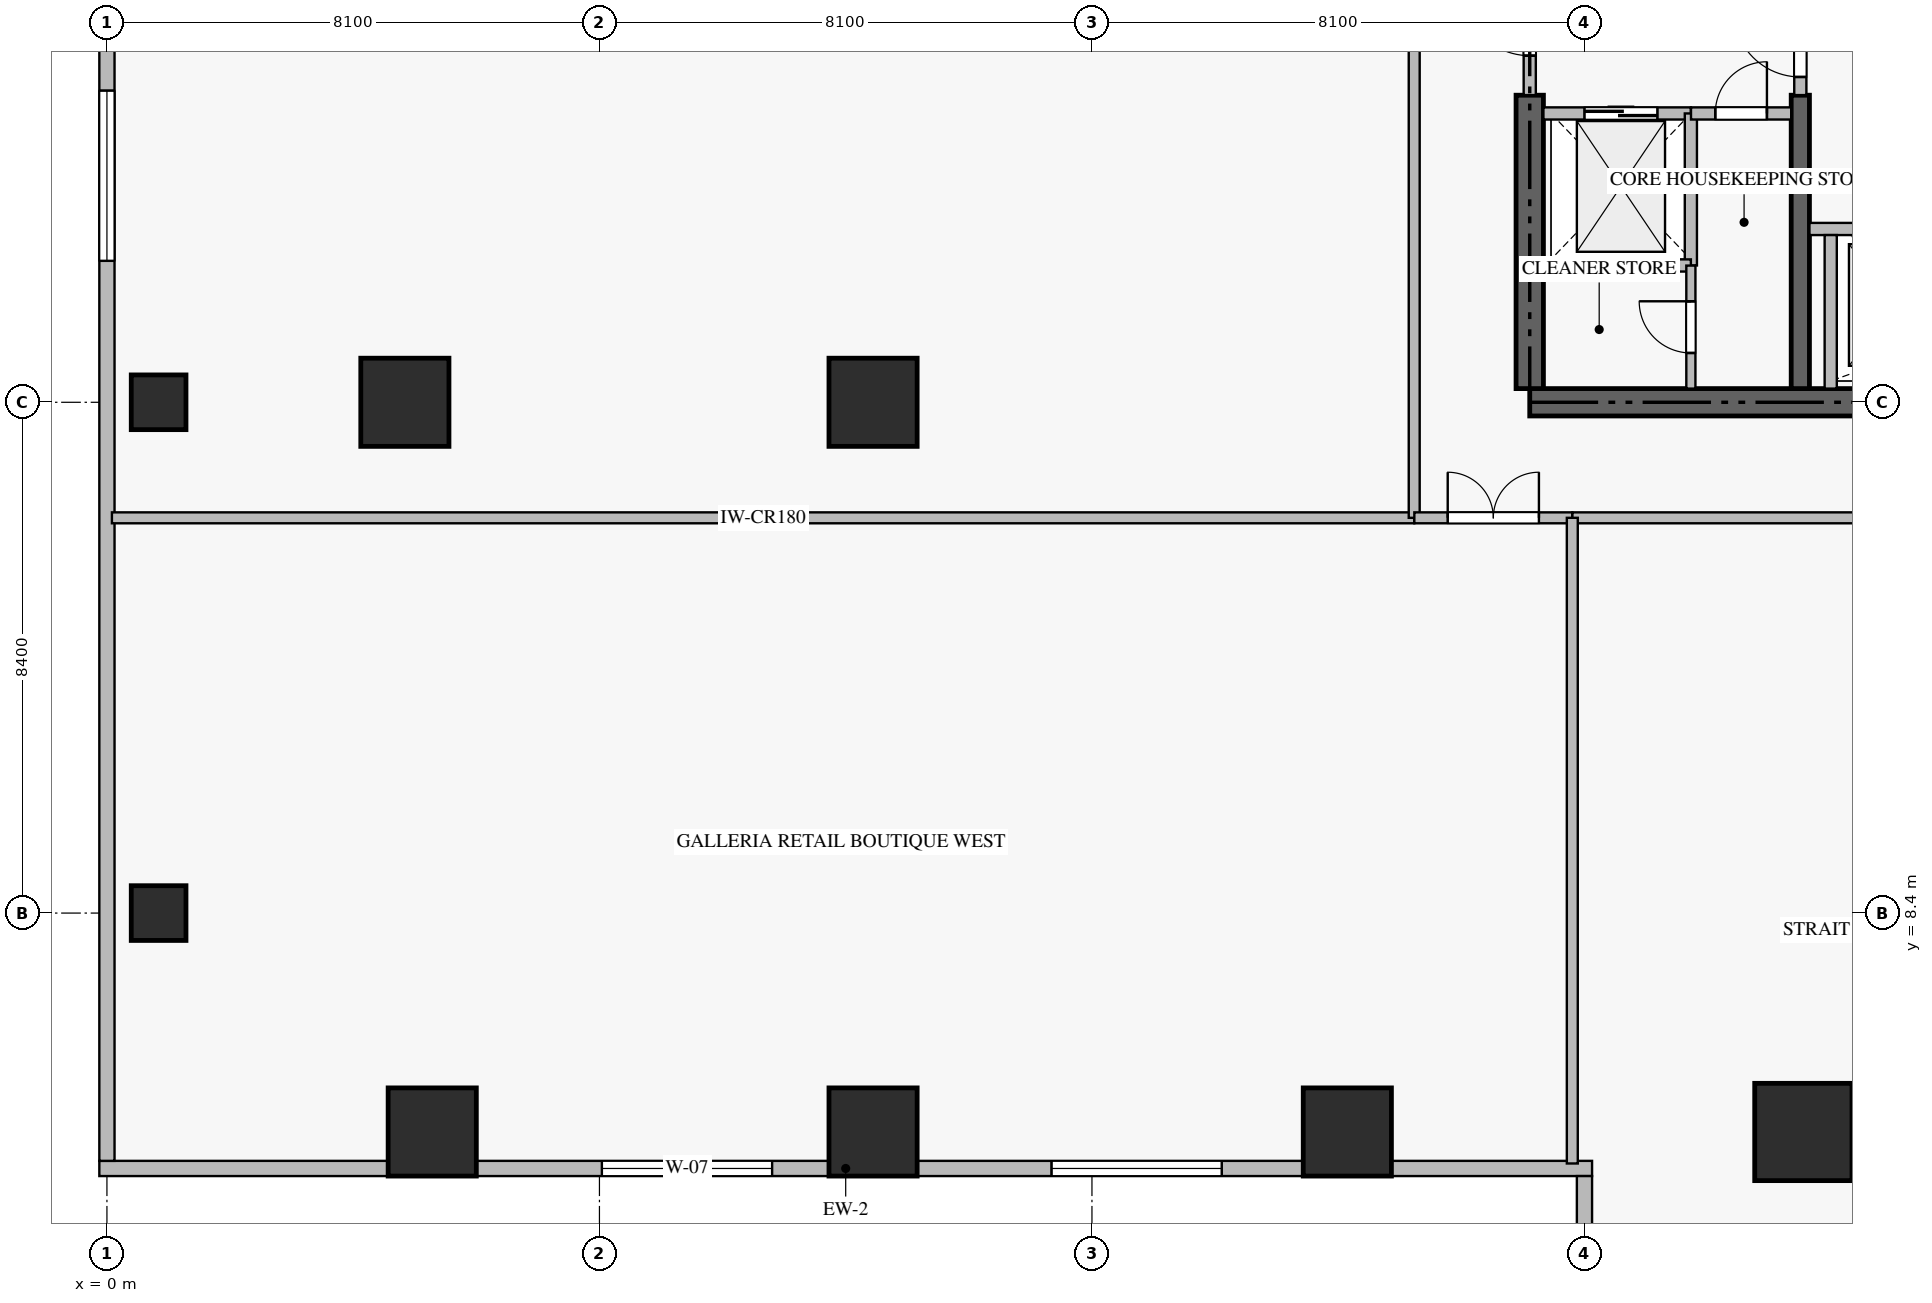
"""IFC4 building model, lengths in metres.
Left out: names, types, materials, properties, quantities, classifications, styles, units other than length and angle.
Written with IfcOpenShell. Run it as: python <this file> out.ifc"""

import sys

from ifc_helpers import new_model, si_unit, direction, frame, frame_2d, origin, origin_2d, place, context, subcontext, project, spatial, rectangle, extrude, source, transform, mapped, element, fill, save


model = new_model("IFC4")
c1 = context("Model", 3, precision=1e-05, world=origin(), true_north=direction((0.0, 1.0)))
c2 = subcontext(c1, "Body", "Model", "MODEL_VIEW")
j1 = project(units=[si_unit("LENGTHUNIT", "METRE"), si_unit("PLANEANGLEUNIT", "RADIAN")], contexts=[c1])
p1 = place(None, origin())
s1 = spatial("IfcSite", under=j1, at=p1, CompositionType="ELEMENT")
p2 = place(p1, origin())
s2 = spatial("IfcBuilding", under=s1, at=p2, CompositionType="ELEMENT")
p3 = place(p2, frame((0.0, 0.0, 5.5)))
s3 = spatial("IfcBuildingStorey", under=s2, at=p3, CompositionType="ELEMENT", Elevation=5.5)
p4 = place(p3, frame((23.4, 16.8, -0.38), z_axis=(0.0, 0.0, 1.0), x_axis=(1.0, 0.0, 0.0)))
e1 = element("IfcWall", 1, at=p4, inside=s3, PredefinedType="SHEAR", context=c2, shape_type="SweptSolid", body=[
    extrude(rectangle(XDim=18.0, YDim=0.45, at=frame_2d((9.0, 0.0))), origin(), (0.0, 0.0, 1.0), 4.998),
])
p5 = place(p3, frame((23.4, 17.025, -0.38), z_axis=(0.0, 0.0, 1.0), x_axis=(0.0, 1.0, 0.0)))
e2 = element("IfcWall", 2, at=p5, inside=s3, PredefinedType="SHEAR", context=c2, shape_type="SweptSolid", body=[
    extrude(rectangle(XDim=4.825, YDim=0.45, at=frame_2d((2.413, 0.0))), origin(), (0.0, 0.0, 1.0), 4.998),
])
p6 = place(p3, frame((27.85, 17.025, -0.38), z_axis=(0.0, 0.0, 1.0), x_axis=(0.0, 1.0, 0.0)))
e3 = element("IfcWall", 3, at=p6, inside=s3, PredefinedType="SHEAR", context=c2, shape_type="SweptSolid", body=[
    extrude(rectangle(XDim=4.825, YDim=0.3, at=frame_2d((2.413, 0.0))), origin(), (0.0, 0.0, 1.0), 4.998),
])
m1 = source(origin(), c2, "Body", "SweptSolid", [
    extrude(rectangle(XDim=0.9, YDim=0.9, at=origin_2d()), origin(), (0.0, 0.0, 1.0), 5.0),
])
for number, where, z_axis, x_axis in (
    (4, (0.85, 8.4, -0.38), (0.0, 0.0, 1.0), (1.0, 0.0, 0.0)),
    (5, (0.85, 16.8, -0.38), (0.0, 0.0, 1.0), (1.0, 0.0, 0.0)),
):
    element("IfcColumn", number, at=place(p3, frame(where, z_axis=z_axis, x_axis=x_axis)), inside=s3, PredefinedType="COLUMN", context=c2, shape_type="MappedRepresentation", body=[
        mapped(m1, transform((0.0, 0.0, 0.0), scale=1.0)),
    ])
m2 = source(origin(), c2, "Body", "SweptSolid", [
    extrude(rectangle(XDim=1.45, YDim=1.45, at=origin_2d()), origin(), (0.0, 0.0, 1.0), 5.0),
])
for number, where, z_axis, x_axis in (
    (6, (12.6, 4.8, -0.38), (0.0, 0.0, 1.0), (1.0, 0.0, 0.0)),
    (7, (20.4, 4.8, -0.38), (0.0, 0.0, 1.0), (1.0, 0.0, 0.0)),
):
    element("IfcColumn", number, at=place(p3, frame(where, z_axis=z_axis, x_axis=x_axis)), inside=s3, PredefinedType="COLUMN", context=c2, shape_type="MappedRepresentation", body=[
        mapped(m2, transform((0.0, 0.0, 0.0), scale=1.0)),
    ])
m3 = source(origin(), c2, "Body", "SweptSolid", [
    extrude(rectangle(XDim=1.6, YDim=1.6, at=origin_2d()), origin(), (0.0, 0.0, 1.0), 5.0),
])
p7 = place(p3, frame((27.9, 4.8, -0.38), z_axis=(0.0, 0.0, 1.0), x_axis=(1.0, 0.0, 0.0)))
e8 = element("IfcColumn", 8, at=p7, inside=s3, PredefinedType="COLUMN", context=c2, shape_type="MappedRepresentation", body=[
    mapped(m3, transform((0.0, 0.0, 0.0), scale=1.0)),
])
for number, where, z_axis, x_axis in (
    (9, (12.6, 16.8, -0.38), (0.0, 0.0, 1.0), (1.0, 0.0, 0.0)),
    (10, (4.9, 16.8, -0.38), (0.0, 0.0, 1.0), (1.0, 0.0, 0.0)),
    (11, (5.35, 4.8, -0.38), (0.0, 0.0, 1.0), (1.0, 0.0, 0.0)),
):
    element("IfcColumn", number, at=place(p3, frame(where, z_axis=z_axis, x_axis=x_axis)), inside=s3, PredefinedType="COLUMN", context=c2, shape_type="MappedRepresentation", body=[
        mapped(m2, transform((0.0, 0.0, 0.0), scale=1.0)),
    ])
p8 = place(p3, frame((-0.125, 4.2, 0.0), z_axis=(0.0, 0.0, 1.0), x_axis=(1.0, 0.0, 0.0)))
e12 = element("IfcWall", 12, at=p8, inside=s3, PredefinedType="ELEMENTEDWALL", context=c2, shape_type="SweptSolid", body=[
    extrude(rectangle(XDim=24.55, YDim=0.25, at=frame_2d((12.275, 0.0))), origin(), (0.0, 0.0, 1.0), 4.605),
])
p9 = place(p8, frame((8.265, 0.0, 0.6)))
e13 = element("IfcOpeningElement", 13, at=p9, cuts=e12, PredefinedType="OPENING", context=c2, shape_type="SweptSolid", body=[
    extrude(rectangle(XDim=2.8, YDim=3.0, at=frame_2d((1.4, 1.5))), frame((0.0, 0.135, 0.0), z_axis=(0.0, -1.0, 0.0), x_axis=(1.0, 0.0, 0.0)), (0.0, 0.0, 1.0), 0.27),
])
p10 = place(p8, frame((15.66, 0.0, 0.6)))
e14 = element("IfcOpeningElement", 14, at=p10, cuts=e12, PredefinedType="OPENING", context=c2, shape_type="SweptSolid", body=[
    extrude(rectangle(XDim=2.8, YDim=3.0, at=frame_2d((1.4, 1.5))), frame((0.0, 0.135, 0.0), z_axis=(0.0, -1.0, 0.0), x_axis=(1.0, 0.0, 0.0)), (0.0, 0.0, 1.0), 0.27),
])
p11 = place(p3, frame((24.3, 4.075, 0.0), z_axis=(0.0, 0.0, 1.0), x_axis=(0.0, -1.0, 0.0)))
e15 = element("IfcWall", 15, at=p11, inside=s3, PredefinedType="ELEMENTEDWALL", context=c2, shape_type="SweptSolid", body=[
    extrude(rectangle(XDim=1.675, YDim=0.25, at=frame_2d((0.837, 0.0))), origin(), (0.0, 0.0, 1.0), 4.605),
])
p12 = place(p3, frame((0.0, 46.075, 0.0), z_axis=(0.0, 0.0, 1.0), x_axis=(0.0, -1.0, 0.0)))
e16 = element("IfcWall", 16, at=p12, inside=s3, PredefinedType="ELEMENTEDWALL", context=c2, shape_type="SweptSolid", body=[
    extrude(rectangle(XDim=41.75, YDim=0.25, at=frame_2d((20.875, 0.0))), origin(), (0.0, 0.0, 1.0), 4.605),
])
p13 = place(p12, frame((14.801, 0.0, 0.6)))
e17 = element("IfcOpeningElement", 17, at=p13, cuts=e16, PredefinedType="OPENING", context=c2, shape_type="SweptSolid", body=[
    extrude(rectangle(XDim=2.8, YDim=3.0, at=frame_2d((1.4, 1.5))), frame((0.0, 0.135, 0.0), z_axis=(0.0, -1.0, 0.0), x_axis=(1.0, 0.0, 0.0)), (0.0, 0.0, 1.0), 0.27),
])
p14 = place(p12, frame((24.149, 0.0, 0.6)))
e18 = element("IfcOpeningElement", 18, at=p14, cuts=e16, PredefinedType="OPENING", context=c2, shape_type="SweptSolid", body=[
    extrude(rectangle(XDim=2.8, YDim=3.0, at=frame_2d((1.4, 1.5))), frame((0.0, 0.135, 0.0), z_axis=(0.0, -1.0, 0.0), x_axis=(1.0, 0.0, 0.0)), (0.0, 0.0, 1.0), 0.27),
])
p15 = place(p3, frame((23.625, 21.55, 0.0), z_axis=(0.0, 0.0, 1.0), x_axis=(1.0, 0.0, 0.0)))
e19 = element("IfcWall", 19, at=p15, inside=s3, PredefinedType="STANDARD", context=c2, shape_type="SweptSolid", body=[
    extrude(rectangle(XDim=2.425, YDim=0.2, at=frame_2d((1.212, 0.0))), origin(), (0.0, 0.0, 1.0), 4.62),
])
p16 = place(p15, frame((0.675, 0.0, 0.0)))
e20 = element("IfcOpeningElement", 20, at=p16, cuts=e19, PredefinedType="OPENING", context=c2, shape_type="SweptSolid", body=[
    extrude(rectangle(XDim=1.2, YDim=2.2, at=frame_2d((0.6, 1.1))), frame((0.0, 0.11, 0.0), z_axis=(0.0, -1.0, 0.0), x_axis=(1.0, 0.0, 0.0)), (0.0, 0.0, 1.0), 0.22),
])
p17 = place(p3, frame((28.0, 19.65, 0.0), z_axis=(0.0, 0.0, 1.0), x_axis=(1.0, 0.0, 0.0)))
e21 = element("IfcWall", 21, at=p17, inside=s3, PredefinedType="STANDARD", context=c2, shape_type="SweptSolid", body=[
    extrude(rectangle(XDim=2.65, YDim=0.2, at=frame_2d((1.325, 0.0))), origin(), (0.0, 0.0, 1.0), 4.62),
])
p18 = place(p17, frame((0.9, 0.0, 0.0)))
e22 = element("IfcOpeningElement", 22, at=p18, cuts=e21, PredefinedType="OPENING", context=c2, shape_type="SweptSolid", body=[
    extrude(rectangle(XDim=1.1, YDim=2.2, at=frame_2d((0.55, 1.1))), frame((0.0, 0.11, 0.0), z_axis=(0.0, -1.0, 0.0), x_axis=(1.0, 0.0, 0.0)), (0.0, 0.0, 1.0), 0.22),
])
p19 = place(p3, frame((28.35, 17.025, 0.0), z_axis=(0.0, 0.0, 1.0), x_axis=(0.0, 1.0, 0.0)))
e23 = element("IfcWall", 23, at=p19, inside=s3, PredefinedType="STANDARD", context=c2, shape_type="SweptSolid", body=[
    extrude(rectangle(XDim=2.525, YDim=0.2, at=frame_2d((1.263, 0.0))), origin(), (0.0, 0.0, 1.0), 4.62),
])
p20 = place(p3, frame((26.05, 19.05, 0.0), z_axis=(0.0, 0.0, 1.0), x_axis=(0.0, 1.0, 0.0)))
e24 = element("IfcWall", 24, at=p20, inside=s3, PredefinedType="STANDARD", context=c2, shape_type="SweptSolid", body=[
    extrude(rectangle(XDim=2.5, YDim=0.2, at=frame_2d((1.25, 0.0))), origin(), (0.0, 0.0, 1.0), 4.62),
])
p21 = place(p3, frame((23.625, 19.05, 0.0), z_axis=(0.0, 0.0, 1.0), x_axis=(1.0, 0.0, 0.0)))
e25 = element("IfcWall", 25, at=p21, inside=s3, PredefinedType="STANDARD", context=c2, shape_type="SweptSolid", body=[
    extrude(rectangle(XDim=2.425, YDim=0.2, at=frame_2d((1.212, 0.0))), origin(), (0.0, 0.0, 1.0), 4.62),
])
p22 = place(p3, frame((26.052, 21.55, 0.0), z_axis=(0.0, 0.0, 1.0), x_axis=(1.0, 0.0, 0.0)))
e26 = element("IfcWall", 26, at=p22, inside=s3, PredefinedType="STANDARD", context=c2, shape_type="SweptSolid", body=[
    extrude(rectangle(XDim=1.648, YDim=0.2, at=frame_2d((0.824, 0.0))), origin(), (0.0, 0.0, 1.0), 4.62),
])
p23 = place(p22, frame((0.399, 0.0, 0.0)))
e27 = element("IfcOpeningElement", 27, at=p23, cuts=e26, PredefinedType="OPENING", context=c2, shape_type="SweptSolid", body=[
    extrude(rectangle(XDim=0.85, YDim=2.1, at=frame_2d((0.425, 1.05))), frame((0.0, 0.11, 0.0), z_axis=(0.0, -1.0, 0.0), x_axis=(1.0, 0.0, 0.0)), (0.0, 0.0, 1.0), 0.22),
])
p24 = place(p3, frame((23.4, 21.852, 0.0), z_axis=(0.0, 0.0, 1.0), x_axis=(0.0, 1.0, 0.0)))
e28 = element("IfcWall", 28, at=p24, inside=s3, PredefinedType="STANDARD", context=c2, shape_type="SweptSolid", body=[
    extrude(rectangle(XDim=2.396, YDim=0.2, at=frame_2d((1.198, 0.0))), origin(), (0.0, 0.0, 1.0), 4.62),
])
p25 = place(p24, frame((0.648, 0.0, 0.0)))
e29 = element("IfcOpeningElement", 29, at=p25, cuts=e28, PredefinedType="OPENING", context=c2, shape_type="SweptSolid", body=[
    extrude(rectangle(XDim=1.1, YDim=2.15, at=frame_2d((0.55, 1.075))), frame((0.0, 0.11, 0.0), z_axis=(0.0, -1.0, 0.0), x_axis=(1.0, 0.0, 0.0)), (0.0, 0.0, 1.0), 0.22),
])
p26 = place(p3, frame((27.85, 21.852, 0.0), z_axis=(0.0, 0.0, 1.0), x_axis=(0.0, 1.0, 0.0)))
e30 = element("IfcWall", 30, at=p26, inside=s3, PredefinedType="STANDARD", context=c2, shape_type="SweptSolid", body=[
    extrude(rectangle(XDim=1.696, YDim=0.2, at=frame_2d((0.848, 0.0))), origin(), (0.0, 0.0, 1.0), 4.62),
])
p27 = place(p26, frame((0.298, 0.0, 0.0)))
e31 = element("IfcOpeningElement", 31, at=p27, cuts=e30, PredefinedType="OPENING", context=c2, shape_type="SweptSolid", body=[
    extrude(rectangle(XDim=1.1, YDim=2.15, at=frame_2d((0.55, 1.075))), frame((0.0, 0.11, 0.0), z_axis=(0.0, -1.0, 0.0), x_axis=(1.0, 0.0, 0.0)), (0.0, 0.0, 1.0), 0.22),
])
p28 = place(p3, frame((26.05, 17.025, 0.0), z_axis=(0.0, 0.0, 1.0), x_axis=(0.0, 1.0, 0.0)))
e32 = element("IfcWall", 32, at=p28, inside=s3, PredefinedType="PARTITIONING", context=c2, shape_type="SweptSolid", body=[
    extrude(rectangle(XDim=2.023, YDim=0.15, at=frame_2d((1.012, 0.0))), origin(), (0.0, 0.0, 1.0), 4.62),
])
p29 = place(p28, frame((0.586, 0.0, 0.0)))
e33 = element("IfcOpeningElement", 33, at=p29, cuts=e32, PredefinedType="OPENING", context=c2, shape_type="SweptSolid", body=[
    extrude(rectangle(XDim=0.85, YDim=2.1, at=frame_2d((0.425, 1.05))), frame((0.0, 0.085, 0.0), z_axis=(0.0, -1.0, 0.0), x_axis=(1.0, 0.0, 0.0)), (0.0, 0.0, 1.0), 0.17),
])
p30 = place(p3, frame((0.082, 14.9, 0.0), z_axis=(0.0, 0.0, 1.0), x_axis=(1.0, 0.0, 0.0)))
e34 = element("IfcWall", 34, at=p30, inside=s3, PredefinedType="PARTITIONING", context=c2, shape_type="SweptSolid", body=[
    extrude(rectangle(XDim=21.418, YDim=0.18, at=frame_2d((10.709, 0.0))), origin(), (0.0, 0.0, 1.0), 4.62),
])
p31 = place(p3, frame((21.5, 14.9, 0.0), z_axis=(0.0, 0.0, 1.0), x_axis=(0.0, 1.0, 0.0)))
e35 = element("IfcWall", 35, at=p31, inside=s3, PredefinedType="PARTITIONING", context=c2, shape_type="SweptSolid", body=[
    extrude(rectangle(XDim=18.18, YDim=0.18, at=frame_2d((9.09, 0.0))), origin(), (0.0, 0.0, 1.0), 4.62),
])
p32 = place(p31, frame((8.34, 0.0, 0.0)))
e36 = element("IfcOpeningElement", 36, at=p32, cuts=e35, PredefinedType="OPENING", context=c2, shape_type="SweptSolid", body=[
    extrude(rectangle(XDim=1.5, YDim=2.25, at=frame_2d((0.75, 1.125))), frame((0.0, 0.1, 0.0), z_axis=(0.0, -1.0, 0.0), x_axis=(1.0, 0.0, 0.0)), (0.0, 0.0, 1.0), 0.2),
])
p33 = place(p3, frame((21.502, 14.9, 0.0), z_axis=(0.0, 0.0, 1.0), x_axis=(1.0, 0.0, 0.0)))
e37 = element("IfcWall", 37, at=p33, inside=s3, PredefinedType="PARTITIONING", context=c2, shape_type="SweptSolid", body=[
    extrude(rectangle(XDim=2.598, YDim=0.18, at=frame_2d((1.299, 0.0))), origin(), (0.0, 0.0, 1.0), 4.62),
])
p34 = place(p33, frame((0.549, 0.0, 0.0)))
e38 = element("IfcOpeningElement", 38, at=p34, cuts=e37, PredefinedType="OPENING", context=c2, shape_type="SweptSolid", body=[
    extrude(rectangle(XDim=1.5, YDim=2.25, at=frame_2d((0.75, 1.125))), frame((0.0, 0.1, 0.0), z_axis=(0.0, -1.0, 0.0), x_axis=(1.0, 0.0, 0.0)), (0.0, 0.0, 1.0), 0.2),
])
p35 = place(p3, frame((24.102, 14.9, 0.0), z_axis=(0.0, 0.0, 1.0), x_axis=(1.0, 0.0, 0.0)))
e39 = element("IfcWall", 39, at=p35, inside=s3, PredefinedType="PARTITIONING", context=c2, shape_type="SweptSolid", body=[
    extrude(rectangle(XDim=14.698, YDim=0.18, at=frame_2d((7.349, 0.0))), origin(), (0.0, 0.0, 1.0), 4.62),
])
p36 = place(p35, frame((6.549, 0.0, 0.0)))
e40 = element("IfcOpeningElement", 40, at=p36, cuts=e39, PredefinedType="OPENING", context=c2, shape_type="SweptSolid", body=[
    extrude(rectangle(XDim=1.6, YDim=2.3, at=frame_2d((0.8, 1.15))), frame((0.0, 0.1, 0.0), z_axis=(0.0, -1.0, 0.0), x_axis=(1.0, 0.0, 0.0)), (0.0, 0.0, 1.0), 0.2),
])
p37 = place(p3, frame((24.1, 4.282, 0.0), z_axis=(0.0, 0.0, 1.0), x_axis=(0.0, 1.0, 0.0)))
e41 = element("IfcWall", 41, at=p37, inside=s3, PredefinedType="PARTITIONING", context=c2, shape_type="SweptSolid", body=[
    extrude(rectangle(XDim=10.618, YDim=0.18, at=frame_2d((5.309, 0.0))), origin(), (0.0, 0.0, 1.0), 4.62),
])
m4 = source(origin(), c2, "Body", "SweptSolid", [
    extrude(rectangle(XDim=2.8, YDim=3.0, at=frame_2d((1.4, 1.5))), frame((0.0, 0.03, 0.0), z_axis=(0.0, -1.0, 0.0), x_axis=(1.0, 0.0, 0.0)), (0.0, 0.0, 1.0), 0.06),
])
p38 = place(p9, origin())
e42 = element("IfcWindow", 42, at=p38, inside=s3, PartitioningType="SINGLE_PANEL", PredefinedType="WINDOW", context=c2, shape_type="MappedRepresentation", body=[
    mapped(m4, transform((0.0, 0.0, 0.0), scale=1.0)),
])
fill(e13, e42)
p39 = place(p10, origin())
e43 = element("IfcWindow", 43, at=p39, inside=s3, PartitioningType="SINGLE_PANEL", PredefinedType="WINDOW", context=c2, shape_type="MappedRepresentation", body=[
    mapped(m4, transform((0.0, 0.0, 0.0), scale=1.0)),
])
fill(e14, e43)
p40 = place(p14, origin())
e44 = element("IfcWindow", 44, at=p40, inside=s3, PartitioningType="SINGLE_PANEL", PredefinedType="WINDOW", context=c2, shape_type="MappedRepresentation", body=[
    mapped(m4, transform((0.0, 0.0, 0.0), scale=1.0)),
])
fill(e18, e44)
m5 = source(origin(), c2, "Body", "SweptSolid", [
    extrude(rectangle(XDim=1.2, YDim=2.2, at=frame_2d((0.6, 1.1))), frame((0.0, 0.025, 0.0), z_axis=(0.0, -1.0, 0.0), x_axis=(1.0, 0.0, 0.0)), (0.0, 0.0, 1.0), 0.05),
])
p41 = place(p16, origin())
e45 = element("IfcDoor", 45, at=p41, inside=s3, OperationType="DOUBLE_DOOR_SLIDING", PredefinedType="DOOR", context=c2, shape_type="MappedRepresentation", body=[
    mapped(m5, transform((0.0, 0.0, 0.0), scale=1.0)),
])
fill(e20, e45)
m6 = source(origin(), c2, "Body", "SweptSolid", [
    extrude(rectangle(XDim=0.85, YDim=2.1, at=frame_2d((0.425, 1.05))), frame((0.0, 0.025, 0.0), z_axis=(0.0, -1.0, 0.0), x_axis=(1.0, 0.0, 0.0)), (0.0, 0.0, 1.0), 0.05),
])
p42 = place(p23, origin())
e46 = element("IfcDoor", 46, at=p42, inside=s3, OperationType="SINGLE_SWING_RIGHT", PredefinedType="DOOR", context=c2, shape_type="MappedRepresentation", body=[
    mapped(m6, transform((0.0, 0.0, 0.0), scale=1.0)),
])
fill(e27, e46)
m7 = source(origin(), c2, "Body", "SweptSolid", [
    extrude(rectangle(XDim=1.1, YDim=2.15, at=frame_2d((0.55, 1.075))), frame((0.0, 0.025, 0.0), z_axis=(0.0, -1.0, 0.0), x_axis=(1.0, 0.0, 0.0)), (0.0, 0.0, 1.0), 0.05),
])
p43 = place(p25, origin())
e47 = element("IfcDoor", 47, at=p43, inside=s3, OperationType="SINGLE_SWING_RIGHT", PredefinedType="DOOR", context=c2, shape_type="MappedRepresentation", body=[
    mapped(m7, transform((0.0, 0.0, 0.0), scale=1.0)),
])
fill(e29, e47)
p44 = place(p27, origin())
e48 = element("IfcDoor", 48, at=p44, inside=s3, OperationType="SINGLE_SWING_RIGHT", PredefinedType="DOOR", context=c2, shape_type="MappedRepresentation", body=[
    mapped(m7, transform((0.0, 0.0, 0.0), scale=1.0)),
])
fill(e31, e48)
p45 = place(p29, origin())
e49 = element("IfcDoor", 49, at=p45, inside=s3, OperationType="SINGLE_SWING_RIGHT", PredefinedType="DOOR", context=c2, shape_type="MappedRepresentation", body=[
    mapped(m6, transform((0.0, 0.0, 0.0), scale=1.0)),
])
fill(e33, e49)
m8 = source(origin(), c2, "Body", "SweptSolid", [
    extrude(rectangle(XDim=1.5, YDim=2.25, at=frame_2d((0.75, 1.125))), frame((0.0, 0.025, 0.0), z_axis=(0.0, -1.0, 0.0), x_axis=(1.0, 0.0, 0.0)), (0.0, 0.0, 1.0), 0.05),
])
p46 = place(p34, origin())
e50 = element("IfcDoor", 50, at=p46, inside=s3, OperationType="DOUBLE_DOOR_SINGLE_SWING", PredefinedType="DOOR", context=c2, shape_type="MappedRepresentation", body=[
    mapped(m8, transform((0.0, 0.0, 0.0), scale=1.0)),
])
fill(e38, e50)
save(model, sys.argv[1])
